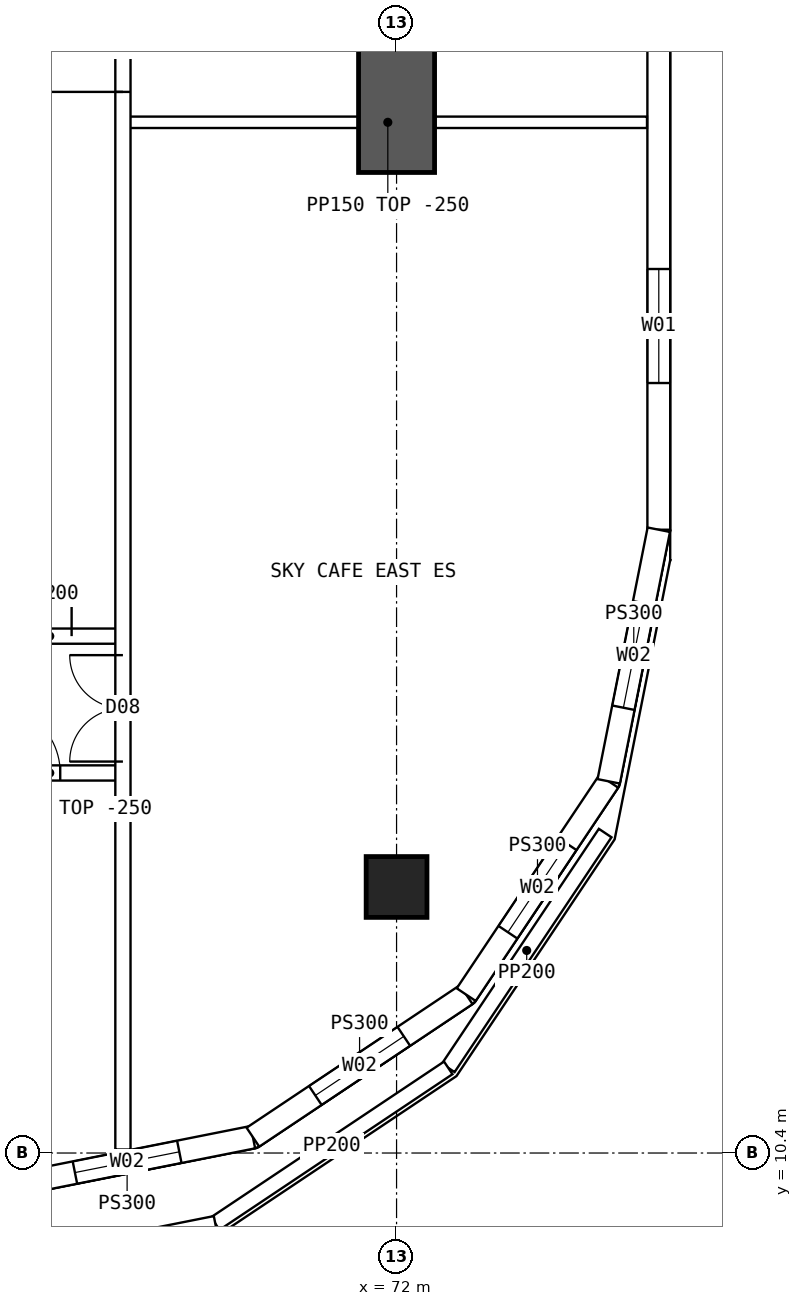
"""IFC4 building model, lengths in metres.
Left out: names, types, materials, properties, quantities, classifications, styles, units other than length and angle.
Written with IfcOpenShell. Run it as: python <this file> out.ifc"""

import sys

from ifc_helpers import new_model, si_unit, direction, frame, frame_2d, origin, origin_2d, place, context, subcontext, project, spatial, polyline, rectangle, hollow_rectangle, outline, extrude, element, fill, save


model = new_model("IFC4")
c1 = context("Model", 3, precision=1e-05, world=origin(), true_north=direction((0.0, 1.0)))
c2 = subcontext(c1, "Body", "Model", "MODEL_VIEW")
j1 = project(units=[si_unit("LENGTHUNIT", "METRE"), si_unit("PLANEANGLEUNIT", "RADIAN")], contexts=[c1])
p1 = place(None, origin())
s1 = spatial("IfcSite", under=j1, at=p1, CompositionType="ELEMENT")
p2 = place(p1, origin())
s2 = spatial("IfcBuilding", under=s1, at=p2, CompositionType="ELEMENT")
p3 = place(p2, frame((0.0, 0.0, 140.35)))
s3 = spatial("IfcBuildingStorey", under=s2, at=p3, CompositionType="ELEMENT", Elevation=140.35)
p4 = place(p3, frame((72.0, 13.9, 0.0), z_axis=(0.0, 0.0, 1.0), x_axis=(1.0, 0.0, 0.0)))
e1 = element("IfcColumn", 1, at=p4, inside=s3, PredefinedType="COLUMN", context=c2, shape_type="SweptSolid", body=[
    extrude(hollow_rectangle(XDim=0.8, YDim=0.8, WallThickness=0.08, at=origin_2d()), origin(), (0.0, 0.0, 1.0), 4.5),
])
p5 = place(p3, frame((72.0, 23.3, 0.0), z_axis=(0.0, 0.0, 1.0), x_axis=(0.0, 1.0, 0.0)))
e2 = element("IfcWall", 2, at=p5, inside=s3, PredefinedType="SHEAR", context=c2, shape_type="SweptSolid", body=[
    extrude(rectangle(XDim=5.0, YDim=1.0, at=frame_2d((2.5, 0.0))), origin(), (0.0, 0.0, 1.0), 4.5),
])
p6 = place(p3, frame((75.45, 18.6, 0.0), z_axis=(0.0, 0.0, 1.0), x_axis=(0.0, 1.0, 0.0)))
e3 = element("IfcWall", 3, at=p6, inside=s3, PredefinedType="SOLIDWALL", context=c2, shape_type="SweptSolid", body=[
    extrude(outline(polyline([(-0.015, -0.15), (26.815, -0.15), (26.785, 0.15), (0.015, 0.15), (-0.015, -0.15)])), origin(), (0.0, 0.0, 1.0), 4.25),
])
p7 = place(p6, frame((1.93, 0.0, 0.9)))
e4 = element("IfcOpeningElement", 4, at=p7, cuts=e3, PredefinedType="OPENING", context=c2, shape_type="SweptSolid", body=[
    extrude(rectangle(XDim=1.5, YDim=2.0, at=frame_2d((0.75, 1.0))), frame((0.0, 0.16, 0.0), z_axis=(0.0, -1.0, 0.0), x_axis=(1.0, 0.0, 0.0)), (0.0, 0.0, 1.0), 0.32),
])
p8 = place(p6, frame((7.29, 0.0, 0.9)))
e5 = element("IfcOpeningElement", 5, at=p8, cuts=e3, PredefinedType="OPENING", context=c2, shape_type="SweptSolid", body=[
    extrude(rectangle(XDim=1.5, YDim=2.0, at=frame_2d((0.75, 1.0))), frame((0.0, 0.16, 0.0), z_axis=(0.0, -1.0, 0.0), x_axis=(1.0, 0.0, 0.0)), (0.0, 0.0, 1.0), 0.32),
])
p9 = place(p6, frame((12.65, 0.0, 0.9)))
e6 = element("IfcOpeningElement", 6, at=p9, cuts=e3, PredefinedType="OPENING", context=c2, shape_type="SweptSolid", body=[
    extrude(rectangle(XDim=1.5, YDim=2.0, at=frame_2d((0.75, 1.0))), frame((0.0, 0.16, 0.0), z_axis=(0.0, -1.0, 0.0), x_axis=(1.0, 0.0, 0.0)), (0.0, 0.0, 1.0), 0.32),
])
p10 = place(p6, frame((18.01, 0.0, 0.9)))
e7 = element("IfcOpeningElement", 7, at=p10, cuts=e3, PredefinedType="OPENING", context=c2, shape_type="SweptSolid", body=[
    extrude(rectangle(XDim=1.5, YDim=2.0, at=frame_2d((0.75, 1.0))), frame((0.0, 0.16, 0.0), z_axis=(0.0, -1.0, 0.0), x_axis=(1.0, 0.0, 0.0)), (0.0, 0.0, 1.0), 0.32),
])
p11 = place(p6, frame((23.37, 0.0, 0.9)))
e8 = element("IfcOpeningElement", 8, at=p11, cuts=e3, PredefinedType="OPENING", context=c2, shape_type="SweptSolid", body=[
    extrude(rectangle(XDim=1.5, YDim=2.0, at=frame_2d((0.75, 1.0))), frame((0.0, 0.16, 0.0), z_axis=(0.0, -1.0, 0.0), x_axis=(1.0, 0.0, 0.0)), (0.0, 0.0, 1.0), 0.32),
])
p12 = place(p3, frame((66.8, 9.95, 0.0), z_axis=(0.0, 0.0, 1.0), x_axis=(0.98078325777, 0.195100490205, 0.0)))
e9 = element("IfcWall", 9, at=p12, inside=s3, PredefinedType="SOLIDWALL", context=c2, shape_type="SweptSolid", body=[
    extrude(outline(polyline([(-0.03, -0.15), (3.405, -0.15), (3.345, 0.15), (0.03, 0.15), (-0.03, -0.15)])), origin(), (0.0, 0.0, 1.0), 4.25),
])
p13 = place(p12, frame((0.988, 0.0, 0.9)))
e10 = element("IfcOpeningElement", 10, at=p13, cuts=e9, PredefinedType="OPENING", context=c2, shape_type="SweptSolid", body=[
    extrude(rectangle(XDim=1.4, YDim=1.8, at=frame_2d((0.7, 0.9))), frame((0.0, 0.16, 0.0), z_axis=(0.0, -1.0, 0.0), x_axis=(1.0, 0.0, 0.0)), (0.0, 0.0, 1.0), 0.32),
])
p14 = place(p3, frame((70.11, 10.608, 0.0), z_axis=(0.0, 0.0, 1.0), x_axis=(0.831493450887, 0.555534554399, 0.0)))
e11 = element("IfcWall", 11, at=p14, inside=s3, PredefinedType="SOLIDWALL", context=c2, shape_type="SweptSolid", body=[
    extrude(outline(polyline([(-0.03, -0.15), (3.405, -0.15), (3.345, 0.15), (0.03, 0.15), (-0.03, -0.15)])), origin(), (0.0, 0.0, 1.0), 4.25),
])
p15 = place(p14, frame((0.988, 0.0, 0.9)))
e12 = element("IfcOpeningElement", 12, at=p15, cuts=e11, PredefinedType="OPENING", context=c2, shape_type="SweptSolid", body=[
    extrude(rectangle(XDim=1.4, YDim=1.8, at=frame_2d((0.7, 0.9))), frame((0.0, 0.16, 0.0), z_axis=(0.0, -1.0, 0.0), x_axis=(1.0, 0.0, 0.0)), (0.0, 0.0, 1.0), 0.32),
])
p16 = place(p3, frame((72.917, 12.483, 0.0), z_axis=(0.0, 0.0, 1.0), x_axis=(0.555534554399, 0.831493450887, 0.0)))
e13 = element("IfcWall", 13, at=p16, inside=s3, PredefinedType="SOLIDWALL", context=c2, shape_type="SweptSolid", body=[
    extrude(outline(polyline([(-0.03, -0.15), (3.405, -0.15), (3.345, 0.15), (0.03, 0.15), (-0.03, -0.15)])), origin(), (0.0, 0.0, 1.0), 4.25),
])
p17 = place(p16, frame((0.988, 0.0, 0.9)))
e14 = element("IfcOpeningElement", 14, at=p17, cuts=e13, PredefinedType="OPENING", context=c2, shape_type="SweptSolid", body=[
    extrude(rectangle(XDim=1.4, YDim=1.8, at=frame_2d((0.7, 0.9))), frame((0.0, 0.16, 0.0), z_axis=(0.0, -1.0, 0.0), x_axis=(1.0, 0.0, 0.0)), (0.0, 0.0, 1.0), 0.32),
])
p18 = place(p3, frame((74.792, 15.29, 0.0), z_axis=(0.0, 0.0, 1.0), x_axis=(0.19508664885, 0.980786011034, 0.0)))
e15 = element("IfcWall", 15, at=p18, inside=s3, PredefinedType="SOLIDWALL", context=c2, shape_type="SweptSolid", body=[
    extrude(outline(polyline([(-0.03, -0.15), (3.39, -0.15), (3.36, 0.15), (0.03, 0.15), (-0.03, -0.15)])), origin(), (0.0, 0.0, 1.0), 4.25),
])
p19 = place(p18, frame((0.988, 0.0, 0.9)))
e16 = element("IfcOpeningElement", 16, at=p19, cuts=e15, PredefinedType="OPENING", context=c2, shape_type="SweptSolid", body=[
    extrude(rectangle(XDim=1.4, YDim=1.8, at=frame_2d((0.7, 0.9))), frame((0.0, 0.16, 0.0), z_axis=(0.0, -1.0, 0.0), x_axis=(1.0, 0.0, 0.0)), (0.0, 0.0, 1.0), 0.32),
])
p20 = place(p3, frame((74.744, 14.61, 0.0), z_axis=(0.0, 0.0, 1.0), x_axis=(-0.555533862817, -0.831493912945, 0.0)))
e17 = element("IfcWall", 17, at=p20, inside=s3, PredefinedType="PARAPET", context=c2, shape_type="SweptSolid", body=[
    extrude(rectangle(XDim=3.716, YDim=0.2, at=frame_2d((1.858, 0.0))), origin(), (0.0, 0.0, 1.0), 1.1),
])
p21 = place(p3, frame((72.68, 11.52, 0.0), z_axis=(0.0, 0.0, 1.0), x_axis=(-0.831479238083, -0.555555826751, 0.0)))
e18 = element("IfcWall", 18, at=p21, inside=s3, PredefinedType="PARAPET", context=c2, shape_type="SweptSolid", body=[
    extrude(rectangle(XDim=3.686, YDim=0.2, at=frame_2d((1.843, 0.0))), origin(), (0.0, 0.0, 1.0), 1.1),
])
p22 = place(p3, frame((69.615, 9.472, 0.0), z_axis=(0.0, 0.0, 1.0), x_axis=(-0.980780584923, -0.195113926303, 0.0)))
e19 = element("IfcWall", 19, at=p22, inside=s3, PredefinedType="PARAPET", context=c2, shape_type="SweptSolid", body=[
    extrude(rectangle(XDim=3.701, YDim=0.2, at=frame_2d((1.851, 0.0))), origin(), (0.0, 0.0, 1.0), 1.1),
])
p23 = place(p3, frame((66.475, 15.4, 0.0), z_axis=(0.0, 0.0, 1.0), x_axis=(1.0, 0.0, 0.0)))
e20 = element("IfcWall", 20, at=p23, inside=s3, PredefinedType="SOLIDWALL", context=c2, shape_type="SweptSolid", body=[
    extrude(rectangle(XDim=1.925, YDim=0.2, at=frame_2d((0.962, 0.0))), origin(), (0.0, 0.0, 1.0), 4.25),
])
p24 = place(p23, frame((0.2, 0.0, 0.0)))
e21 = element("IfcOpeningElement", 21, at=p24, cuts=e20, PredefinedType="OPENING", context=c2, shape_type="SweptSolid", body=[
    extrude(rectangle(XDim=0.9, YDim=2.1, at=frame_2d((0.45, 1.05))), frame((0.0, 0.11, 0.0), z_axis=(0.0, -1.0, 0.0), x_axis=(1.0, 0.0, 0.0)), (0.0, 0.0, 1.0), 0.22),
])
p25 = place(p3, frame((66.475, 17.2, 0.0), z_axis=(0.0, 0.0, 1.0), x_axis=(1.0, 0.0, 0.0)))
e22 = element("IfcWall", 22, at=p25, inside=s3, PredefinedType="SOLIDWALL", context=c2, shape_type="SweptSolid", body=[
    extrude(rectangle(XDim=1.925, YDim=0.2, at=frame_2d((0.962, 0.0))), origin(), (0.0, 0.0, 1.0), 4.25),
])
p26 = place(p25, frame((0.05, 0.0, 0.0)))
e23 = element("IfcOpeningElement", 23, at=p26, cuts=e22, PredefinedType="OPENING", context=c2, shape_type="SweptSolid", body=[
    extrude(rectangle(XDim=1.2, YDim=2.1, at=frame_2d((0.6, 1.05))), frame((0.0, 0.11, 0.0), z_axis=(0.0, -1.0, 0.0), x_axis=(1.0, 0.0, 0.0)), (0.0, 0.0, 1.0), 0.22),
])
p27 = place(p3, frame((68.4, 10.446, 0.0), z_axis=(0.0, 0.0, 1.0), x_axis=(0.0, 1.0, 0.0)))
e24 = element("IfcWall", 24, at=p27, inside=s3, PredefinedType="SOLIDWALL", context=c2, shape_type="SweptSolid", body=[
    extrude(rectangle(XDim=43.107, YDim=0.2, at=frame_2d((21.554, 0.0))), origin(), (0.0, 0.0, 1.0), 4.25),
])
p28 = place(p27, frame((13.914, 0.0, 0.0)))
e25 = element("IfcOpeningElement", 25, at=p28, cuts=e24, PredefinedType="OPENING", context=c2, shape_type="SweptSolid", body=[
    extrude(rectangle(XDim=1.2, YDim=2.1, at=frame_2d((0.6, 1.05))), frame((0.0, 0.11, 0.0), z_axis=(0.0, -1.0, 0.0), x_axis=(1.0, 0.0, 0.0)), (0.0, 0.0, 1.0), 0.22),
])
p29 = place(p27, frame((27.994, 0.0, 0.0)))
e26 = element("IfcOpeningElement", 26, at=p29, cuts=e24, PredefinedType="OPENING", context=c2, shape_type="SweptSolid", body=[
    extrude(rectangle(XDim=1.2, YDim=2.1, at=frame_2d((0.6, 1.05))), frame((0.0, 0.11, 0.0), z_axis=(0.0, -1.0, 0.0), x_axis=(1.0, 0.0, 0.0)), (0.0, 0.0, 1.0), 0.22),
])
p30 = place(p27, frame((5.104, 0.0, 0.0)))
e27 = element("IfcOpeningElement", 27, at=p30, cuts=e24, PredefinedType="OPENING", context=c2, shape_type="SweptSolid", body=[
    extrude(rectangle(XDim=1.4, YDim=2.1, at=frame_2d((0.7, 1.05))), frame((0.0, 0.11, 0.0), z_axis=(0.0, -1.0, 0.0), x_axis=(1.0, 0.0, 0.0)), (0.0, 0.0, 1.0), 0.22),
])
p31 = place(p27, frame((36.504, 0.0, 0.0)))
e28 = element("IfcOpeningElement", 28, at=p31, cuts=e24, PredefinedType="OPENING", context=c2, shape_type="SweptSolid", body=[
    extrude(rectangle(XDim=1.4, YDim=2.1, at=frame_2d((0.7, 1.05))), frame((0.0, 0.11, 0.0), z_axis=(0.0, -1.0, 0.0), x_axis=(1.0, 0.0, 0.0)), (0.0, 0.0, 1.0), 0.22),
])
p32 = place(p3, frame((68.475, 23.96, 0.0), z_axis=(0.0, 0.0, 1.0), x_axis=(1.0, 0.0, 0.0)))
e29 = element("IfcWall", 29, at=p32, inside=s3, PredefinedType="PARTITIONING", context=c2, shape_type="SweptSolid", body=[
    extrude(rectangle(XDim=6.82, YDim=0.15, at=frame_2d((3.41, 0.0))), origin(), (0.0, 0.0, 1.0), 4.25),
])
p33 = place(p7, origin())
e30 = element("IfcWindow", 30, at=p33, inside=s3, PartitioningType="SINGLE_PANEL", PredefinedType="WINDOW", context=c2, shape_type="SweptSolid", body=[
    extrude(rectangle(XDim=1.5, YDim=2.0, at=frame_2d((0.75, 1.0))), frame((0.0, 0.03, 0.0), z_axis=(0.0, -1.0, 0.0), x_axis=(1.0, 0.0, 0.0)), (0.0, 0.0, 1.0), 0.06),
])
fill(e4, e30)
p34 = place(p13, origin())
e31 = element("IfcWindow", 31, at=p34, inside=s3, PartitioningType="SINGLE_PANEL", PredefinedType="WINDOW", context=c2, shape_type="SweptSolid", body=[
    extrude(rectangle(XDim=1.4, YDim=1.8, at=frame_2d((0.7, 0.9))), frame((0.0, 0.03, 0.0), z_axis=(0.0, -1.0, 0.0), x_axis=(1.0, 0.0, 0.0)), (0.0, 0.0, 1.0), 0.06),
])
fill(e10, e31)
p35 = place(p15, origin())
e32 = element("IfcWindow", 32, at=p35, inside=s3, PartitioningType="SINGLE_PANEL", PredefinedType="WINDOW", context=c2, shape_type="SweptSolid", body=[
    extrude(rectangle(XDim=1.4, YDim=1.8, at=frame_2d((0.7, 0.9))), frame((0.0, 0.03, 0.0), z_axis=(0.0, -1.0, 0.0), x_axis=(1.0, 0.0, 0.0)), (0.0, 0.0, 1.0), 0.06),
])
fill(e12, e32)
p36 = place(p17, origin())
e33 = element("IfcWindow", 33, at=p36, inside=s3, PartitioningType="SINGLE_PANEL", PredefinedType="WINDOW", context=c2, shape_type="SweptSolid", body=[
    extrude(rectangle(XDim=1.4, YDim=1.8, at=frame_2d((0.7, 0.9))), frame((0.0, 0.03, 0.0), z_axis=(0.0, -1.0, 0.0), x_axis=(1.0, 0.0, 0.0)), (0.0, 0.0, 1.0), 0.06),
])
fill(e14, e33)
p37 = place(p19, origin())
e34 = element("IfcWindow", 34, at=p37, inside=s3, PartitioningType="SINGLE_PANEL", PredefinedType="WINDOW", context=c2, shape_type="SweptSolid", body=[
    extrude(rectangle(XDim=1.4, YDim=1.8, at=frame_2d((0.7, 0.9))), frame((0.0, 0.03, 0.0), z_axis=(0.0, -1.0, 0.0), x_axis=(1.0, 0.0, 0.0)), (0.0, 0.0, 1.0), 0.06),
])
fill(e16, e34)
p38 = place(p26, origin())
e35 = element("IfcDoor", 35, at=p38, inside=s3, OperationType="DOUBLE_DOOR_SINGLE_SWING", PredefinedType="DOOR", context=c2, shape_type="SweptSolid", body=[
    extrude(rectangle(XDim=1.2, YDim=2.1, at=frame_2d((0.6, 1.05))), frame((0.0, 0.025, 0.0), z_axis=(0.0, -1.0, 0.0), x_axis=(1.0, 0.0, 0.0)), (0.0, 0.0, 1.0), 0.05),
])
fill(e23, e35)
p39 = place(p28, origin())
e36 = element("IfcDoor", 36, at=p39, inside=s3, OperationType="SINGLE_SWING_LEFT", PredefinedType="DOOR", context=c2, shape_type="SweptSolid", body=[
    extrude(rectangle(XDim=1.2, YDim=2.1, at=frame_2d((0.6, 1.05))), frame((0.0, 0.025, 0.0), z_axis=(0.0, -1.0, 0.0), x_axis=(1.0, 0.0, 0.0)), (0.0, 0.0, 1.0), 0.05),
])
fill(e25, e36)
p40 = place(p30, origin())
e37 = element("IfcDoor", 37, at=p40, inside=s3, OperationType="DOUBLE_DOOR_SINGLE_SWING", PredefinedType="DOOR", context=c2, shape_type="SweptSolid", body=[
    extrude(rectangle(XDim=1.4, YDim=2.1, at=frame_2d((0.7, 1.05))), frame((0.0, 0.025, 0.0), z_axis=(0.0, -1.0, 0.0), x_axis=(1.0, 0.0, 0.0)), (0.0, 0.0, 1.0), 0.05),
])
fill(e27, e37)
p41 = place(p24, origin())
e38 = element("IfcDoor", 38, at=p41, inside=s3, OperationType="SINGLE_SWING_LEFT", PredefinedType="DOOR", context=c2, shape_type="SweptSolid", body=[
    extrude(rectangle(XDim=0.9, YDim=2.1, at=frame_2d((0.45, 1.05))), frame((0.0, 0.025, 0.0), z_axis=(0.0, -1.0, 0.0), x_axis=(1.0, 0.0, 0.0)), (0.0, 0.0, 1.0), 0.05),
])
fill(e21, e38)
save(model, sys.argv[1])
